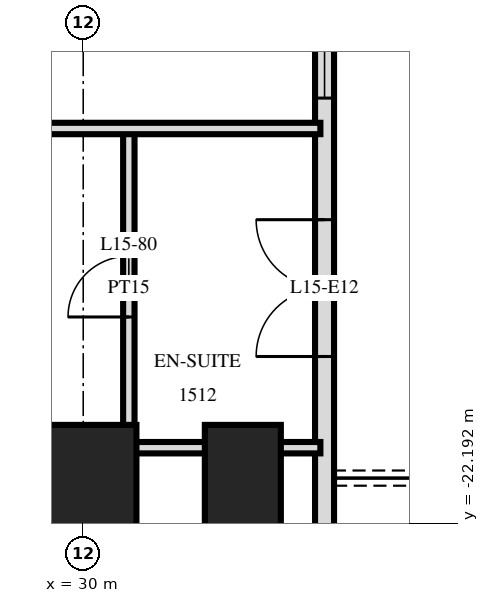
"""IFC4 building model, lengths in metres.
Left out: names, types, materials, properties, quantities, classifications, styles, units other than length and angle.
Written with IfcOpenShell. Run it as: python <this file> out.ifc"""

import sys

from ifc_helpers import new_model, si_unit, direction, frame, frame_2d, origin, origin_2d, place, context, subcontext, project, spatial, rectangle, extrude, element, fill, save


model = new_model("IFC4")
c1 = context("Model", 3, precision=1e-05, world=origin(), true_north=direction((0.0, 1.0)))
c2 = subcontext(c1, "Body", "Model", "MODEL_VIEW")
j1 = project(units=[si_unit("LENGTHUNIT", "METRE"), si_unit("PLANEANGLEUNIT", "RADIAN")], contexts=[c1])
p1 = place(None, origin())
s1 = spatial("IfcSite", under=j1, at=p1, CompositionType="ELEMENT")
p2 = place(p1, origin())
s2 = spatial("IfcBuilding", under=s1, at=p2, CompositionType="ELEMENT")
p3 = place(p2, frame((0.0, 0.0, 63.6)))
s3 = spatial("IfcBuildingStorey", under=s2, at=p3, CompositionType="ELEMENT", Elevation=63.6)
p4 = place(p3, frame((30.0, -21.6, 0.0), z_axis=(0.0, 0.0, 1.0), x_axis=(1.0, 0.0, 0.0)))
e1 = element("IfcColumn", 1, at=p4, inside=s3, PredefinedType="COLUMN", context=c2, shape_type="SweptSolid", body=[
    extrude(rectangle(XDim=1.4, YDim=1.4, at=origin_2d()), origin(), (0.0, 0.0, 1.0), 3.6),
])
p5 = place(p3, frame((32.1, -21.6, 0.0), z_axis=(0.0, 0.0, 1.0), x_axis=(0.0, 1.0, 0.0)))
e2 = element("IfcColumn", 2, at=p5, inside=s3, PredefinedType="COLUMN", context=c2, shape_type="SweptSolid", body=[
    extrude(rectangle(XDim=1.4, YDim=1.0, at=origin_2d()), origin(), (0.0, 0.0, 1.0), 3.6),
])
p6 = place(p3, frame((33.175, -24.875, 0.0), z_axis=(0.0, 0.0, 1.0), x_axis=(0.0, 1.0, 0.0)))
e3 = element("IfcWall", 3, at=p6, inside=s3, PredefinedType="SOLIDWALL", context=c2, shape_type="SweptSolid", body=[
    extrude(rectangle(XDim=21.551, YDim=0.25, at=frame_2d((10.775, 0.0))), origin(), (0.0, 0.0, 1.0), 3.32),
])
p7 = place(p6, frame((0.575, 0.0, 0.0)))
e4 = element("IfcOpeningElement", 4, at=p7, cuts=e3, PredefinedType="OPENING", context=c2, shape_type="SweptSolid", body=[
    extrude(rectangle(XDim=1.8, YDim=2.4, at=frame_2d((0.9, 1.2))), frame((0.0, 0.135, 0.0), z_axis=(0.0, -1.0, 0.0), x_axis=(1.0, 0.0, 0.0)), (0.0, 0.0, 1.0), 0.27),
])
p8 = place(p6, frame((4.875, 0.0, 0.0)))
e5 = element("IfcOpeningElement", 5, at=p8, cuts=e3, PredefinedType="OPENING", context=c2, shape_type="SweptSolid", body=[
    extrude(rectangle(XDim=1.8, YDim=2.4, at=frame_2d((0.9, 1.2))), frame((0.0, 0.135, 0.0), z_axis=(0.0, -1.0, 0.0), x_axis=(1.0, 0.0, 0.0)), (0.0, 0.0, 1.0), 0.27),
])
p9 = place(p6, frame((8.275, 0.0, 0.3)))
e6 = element("IfcOpeningElement", 6, at=p9, cuts=e3, PredefinedType="OPENING", context=c2, shape_type="SweptSolid", body=[
    extrude(rectangle(XDim=1.2, YDim=2.1, at=frame_2d((0.6, 1.05))), frame((0.0, 0.135, 0.0), z_axis=(0.0, -1.0, 0.0), x_axis=(1.0, 0.0, 0.0)), (0.0, 0.0, 1.0), 0.27),
])
p10 = place(p6, frame((10.175, 0.0, 0.3)))
e7 = element("IfcOpeningElement", 7, at=p10, cuts=e3, PredefinedType="OPENING", context=c2, shape_type="SweptSolid", body=[
    extrude(rectangle(XDim=2.4, YDim=2.1, at=frame_2d((1.2, 1.05))), frame((0.0, 0.135, 0.0), z_axis=(0.0, -1.0, 0.0), x_axis=(1.0, 0.0, 0.0)), (0.0, 0.0, 1.0), 0.27),
])
p11 = place(p6, frame((13.475, 0.0, 0.0)))
e8 = element("IfcOpeningElement", 8, at=p11, cuts=e3, PredefinedType="OPENING", context=c2, shape_type="SweptSolid", body=[
    extrude(rectangle(XDim=1.8, YDim=2.4, at=frame_2d((0.9, 1.2))), frame((0.0, 0.135, 0.0), z_axis=(0.0, -1.0, 0.0), x_axis=(1.0, 0.0, 0.0)), (0.0, 0.0, 1.0), 0.27),
])
p12 = place(p3, frame((30.6, -21.2, 0.0), z_axis=(0.0, 0.0, 1.0), x_axis=(0.0, 1.0, 0.0)))
e9 = element("IfcWall", 9, at=p12, inside=s3, PredefinedType="PARTITIONING", context=c2, shape_type="SweptSolid", body=[
    extrude(rectangle(XDim=4.2, YDim=0.15, at=frame_2d((2.1, 0.0))), origin(), (0.0, 0.0, 1.0), 3.32),
])
p13 = place(p12, frame((1.72, 0.0, 0.0)))
e10 = element("IfcOpeningElement", 10, at=p13, cuts=e9, PredefinedType="OPENING", context=c2, shape_type="SweptSolid", body=[
    extrude(rectangle(XDim=0.8, YDim=2.1, at=frame_2d((0.4, 1.05))), frame((0.0, 0.085, 0.0), z_axis=(0.0, -1.0, 0.0), x_axis=(1.0, 0.0, 0.0)), (0.0, 0.0, 1.0), 0.17),
])
p14 = place(p3, frame((30.6, -21.2, 0.0), z_axis=(0.0, 0.0, 1.0), x_axis=(1.0, 0.0, 0.0)))
e11 = element("IfcWall", 11, at=p14, inside=s3, PredefinedType="PARTITIONING", context=c2, shape_type="SweptSolid", body=[
    extrude(rectangle(XDim=2.52, YDim=0.15, at=frame_2d((1.26, 0.0))), origin(), (0.0, 0.0, 1.0), 3.32),
])
p15 = place(p3, frame((-33.12, -17.0, 0.0), z_axis=(0.0, 0.0, 1.0), x_axis=(1.0, 0.0, 0.0)))
e12 = element("IfcWall", 12, at=p15, inside=s3, PredefinedType="PARTITIONING", context=c2, shape_type="SweptSolid", body=[
    extrude(rectangle(XDim=66.24, YDim=0.15, at=frame_2d((33.12, 0.0))), origin(), (0.0, 0.0, 1.0), 3.32),
])
p16 = place(p15, frame((12.27, 0.0, 0.0)))
e13 = element("IfcOpeningElement", 13, at=p16, cuts=e12, PredefinedType="OPENING", context=c2, shape_type="SweptSolid", body=[
    extrude(rectangle(XDim=1.0, YDim=2.1, at=frame_2d((0.5, 1.05))), frame((0.0, 0.085, 0.0), z_axis=(0.0, -1.0, 0.0), x_axis=(1.0, 0.0, 0.0)), (0.0, 0.0, 1.0), 0.17),
])
p17 = place(p15, frame((16.97, 0.0, 0.0)))
e14 = element("IfcOpeningElement", 14, at=p17, cuts=e12, PredefinedType="OPENING", context=c2, shape_type="SweptSolid", body=[
    extrude(rectangle(XDim=1.0, YDim=2.1, at=frame_2d((0.5, 1.05))), frame((0.0, 0.085, 0.0), z_axis=(0.0, -1.0, 0.0), x_axis=(1.0, 0.0, 0.0)), (0.0, 0.0, 1.0), 0.17),
])
p18 = place(p15, frame((18.27, 0.0, 0.0)))
e15 = element("IfcOpeningElement", 15, at=p18, cuts=e12, PredefinedType="OPENING", context=c2, shape_type="SweptSolid", body=[
    extrude(rectangle(XDim=1.0, YDim=2.1, at=frame_2d((0.5, 1.05))), frame((0.0, 0.085, 0.0), z_axis=(0.0, -1.0, 0.0), x_axis=(1.0, 0.0, 0.0)), (0.0, 0.0, 1.0), 0.17),
])
p19 = place(p15, frame((22.97, 0.0, 0.0)))
e16 = element("IfcOpeningElement", 16, at=p19, cuts=e12, PredefinedType="OPENING", context=c2, shape_type="SweptSolid", body=[
    extrude(rectangle(XDim=1.0, YDim=2.1, at=frame_2d((0.5, 1.05))), frame((0.0, 0.085, 0.0), z_axis=(0.0, -1.0, 0.0), x_axis=(1.0, 0.0, 0.0)), (0.0, 0.0, 1.0), 0.17),
])
p20 = place(p15, frame((24.27, 0.0, 0.0)))
e17 = element("IfcOpeningElement", 17, at=p20, cuts=e12, PredefinedType="OPENING", context=c2, shape_type="SweptSolid", body=[
    extrude(rectangle(XDim=1.0, YDim=2.1, at=frame_2d((0.5, 1.05))), frame((0.0, 0.085, 0.0), z_axis=(0.0, -1.0, 0.0), x_axis=(1.0, 0.0, 0.0)), (0.0, 0.0, 1.0), 0.17),
])
p21 = place(p15, frame((28.97, 0.0, 0.0)))
e18 = element("IfcOpeningElement", 18, at=p21, cuts=e12, PredefinedType="OPENING", context=c2, shape_type="SweptSolid", body=[
    extrude(rectangle(XDim=1.0, YDim=2.1, at=frame_2d((0.5, 1.05))), frame((0.0, 0.085, 0.0), z_axis=(0.0, -1.0, 0.0), x_axis=(1.0, 0.0, 0.0)), (0.0, 0.0, 1.0), 0.17),
])
p22 = place(p15, frame((30.27, 0.0, 0.0)))
e19 = element("IfcOpeningElement", 19, at=p22, cuts=e12, PredefinedType="OPENING", context=c2, shape_type="SweptSolid", body=[
    extrude(rectangle(XDim=1.0, YDim=2.1, at=frame_2d((0.5, 1.05))), frame((0.0, 0.085, 0.0), z_axis=(0.0, -1.0, 0.0), x_axis=(1.0, 0.0, 0.0)), (0.0, 0.0, 1.0), 0.17),
])
p23 = place(p15, frame((33.82, 0.0, 0.0)))
e20 = element("IfcOpeningElement", 20, at=p23, cuts=e12, PredefinedType="OPENING", context=c2, shape_type="SweptSolid", body=[
    extrude(rectangle(XDim=1.0, YDim=2.1, at=frame_2d((0.5, 1.05))), frame((0.0, 0.085, 0.0), z_axis=(0.0, -1.0, 0.0), x_axis=(1.0, 0.0, 0.0)), (0.0, 0.0, 1.0), 0.17),
])
p24 = place(p15, frame((46.27, 0.0, 0.0)))
e21 = element("IfcOpeningElement", 21, at=p24, cuts=e12, PredefinedType="OPENING", context=c2, shape_type="SweptSolid", body=[
    extrude(rectangle(XDim=1.0, YDim=2.1, at=frame_2d((0.5, 1.05))), frame((0.0, 0.085, 0.0), z_axis=(0.0, -1.0, 0.0), x_axis=(1.0, 0.0, 0.0)), (0.0, 0.0, 1.0), 0.17),
])
p25 = place(p15, frame((52.97, 0.0, 0.0)))
e22 = element("IfcOpeningElement", 22, at=p25, cuts=e12, PredefinedType="OPENING", context=c2, shape_type="SweptSolid", body=[
    extrude(rectangle(XDim=1.0, YDim=2.1, at=frame_2d((0.5, 1.05))), frame((0.0, 0.085, 0.0), z_axis=(0.0, -1.0, 0.0), x_axis=(1.0, 0.0, 0.0)), (0.0, 0.0, 1.0), 0.17),
])
p26 = place(p15, frame((6.05, 0.0, 0.0)))
e23 = element("IfcOpeningElement", 23, at=p26, cuts=e12, PredefinedType="OPENING", context=c2, shape_type="SweptSolid", body=[
    extrude(rectangle(XDim=1.0, YDim=2.1, at=frame_2d((0.5, 1.05))), frame((0.0, 0.085, 0.0), z_axis=(0.0, -1.0, 0.0), x_axis=(1.0, 0.0, 0.0)), (0.0, 0.0, 1.0), 0.17),
])
p27 = place(p15, frame((59.15, 0.0, 0.0)))
e24 = element("IfcOpeningElement", 24, at=p27, cuts=e12, PredefinedType="OPENING", context=c2, shape_type="SweptSolid", body=[
    extrude(rectangle(XDim=1.0, YDim=2.1, at=frame_2d((0.5, 1.05))), frame((0.0, 0.085, 0.0), z_axis=(0.0, -1.0, 0.0), x_axis=(1.0, 0.0, 0.0)), (0.0, 0.0, 1.0), 0.17),
])
p28 = place(p8, origin())
e25 = element("IfcDoor", 25, at=p28, inside=s3, OperationType="DOUBLE_DOOR_SINGLE_SWING", PredefinedType="DOOR", context=c2, shape_type="SweptSolid", body=[
    extrude(rectangle(XDim=1.8, YDim=2.4, at=frame_2d((0.9, 1.2))), frame((0.0, 0.025, 0.0), z_axis=(0.0, -1.0, 0.0), x_axis=(1.0, 0.0, 0.0)), (0.0, 0.0, 1.0), 0.05),
])
fill(e5, e25)
p29 = place(p9, origin())
e26 = element("IfcWindow", 26, at=p29, inside=s3, PartitioningType="SINGLE_PANEL", PredefinedType="WINDOW", context=c2, shape_type="SweptSolid", body=[
    extrude(rectangle(XDim=1.2, YDim=2.1, at=frame_2d((0.6, 1.05))), frame((0.0, 0.03, 0.0), z_axis=(0.0, -1.0, 0.0), x_axis=(1.0, 0.0, 0.0)), (0.0, 0.0, 1.0), 0.06),
])
fill(e6, e26)
p30 = place(p13, origin())
e27 = element("IfcDoor", 27, at=p30, inside=s3, OperationType="SINGLE_SWING_RIGHT", PredefinedType="DOOR", context=c2, shape_type="SweptSolid", body=[
    extrude(rectangle(XDim=0.8, YDim=2.1, at=frame_2d((0.4, 1.05))), frame((0.0, 0.025, 0.0), z_axis=(0.0, -1.0, 0.0), x_axis=(1.0, 0.0, 0.0)), (0.0, 0.0, 1.0), 0.05),
])
fill(e10, e27)
save(model, sys.argv[1])
